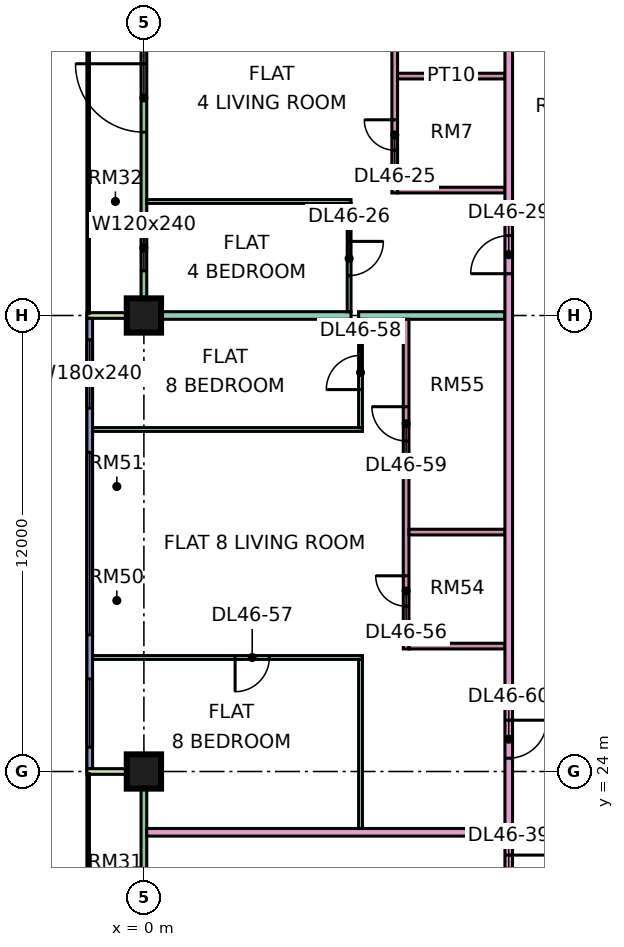
"""IFC4 building model, lengths in metres.
Left out: names, types, materials, properties, quantities, classifications, styles, units other than length and angle.
Written with IfcOpenShell. Run it as: python <this file> out.ifc"""

import sys

from ifc_helpers import new_model, si_unit, direction, frame, frame_2d, origin, origin_2d, place, context, subcontext, project, spatial, rectangle, extrude, element, fill, save


model = new_model("IFC4")
c1 = context("Model", 3, precision=1e-05, world=origin(), true_north=direction((0.0, 1.0)))
c2 = subcontext(c1, "Body", "Model", "MODEL_VIEW")
j1 = project(units=[si_unit("LENGTHUNIT", "METRE"), si_unit("PLANEANGLEUNIT", "RADIAN")], contexts=[c1])
p1 = place(None, origin())
s1 = spatial("IfcSite", under=j1, at=p1, CompositionType="ELEMENT")
p2 = place(p1, origin())
s2 = spatial("IfcBuilding", under=s1, at=p2, CompositionType="ELEMENT")
p3 = place(p2, frame((0.0, 0.0, 198.65)))
s3 = spatial("IfcBuildingStorey", under=s2, at=p3, CompositionType="ELEMENT", Elevation=198.65)
p4 = place(p3, frame((0.0, 24.0, 0.0), z_axis=(0.0, 0.0, 1.0), x_axis=(1.0, 0.0, 0.0)))
e1 = element("IfcColumn", 1, at=p4, inside=s3, PredefinedType="COLUMN", context=c2, shape_type="SweptSolid", body=[
    extrude(rectangle(XDim=0.9, YDim=0.9, at=origin_2d()), origin(), (0.0, 0.0, 1.0), 3.75),
])
p5 = place(p3, frame((0.0, 36.0, 0.0), z_axis=(0.0, 0.0, 1.0), x_axis=(1.0, 0.0, 0.0)))
e2 = element("IfcColumn", 2, at=p5, inside=s3, PredefinedType="COLUMN", context=c2, shape_type="SweptSolid", body=[
    extrude(rectangle(XDim=0.9, YDim=0.9, at=origin_2d()), origin(), (0.0, 0.0, 1.0), 3.75),
])
p6 = place(p3, frame((0.0, 47.925, 0.0), z_axis=(0.0, 0.0, 1.0), x_axis=(0.0, -1.0, 0.0)))
e3 = element("IfcWall", 3, at=p6, inside=s3, PredefinedType="SOLIDWALL", context=c2, shape_type="SweptSolid", body=[
    extrude(rectangle(XDim=11.85, YDim=0.15, at=frame_2d((5.925, 0.0))), origin(), (0.0, 0.0, 1.0), 3.35),
])
p7 = place(p6, frame((0.587, 0.0, 0.45)))
e4 = element("IfcOpeningElement", 4, at=p7, cuts=e3, PredefinedType="OPENING", context=c2, shape_type="SweptSolid", body=[
    extrude(rectangle(XDim=1.2, YDim=2.4, at=frame_2d((0.6, 1.2))), frame((0.0, 0.085, 0.0), z_axis=(0.0, -1.0, 0.0), x_axis=(1.0, 0.0, 0.0)), (0.0, 0.0, 1.0), 0.17),
])
p8 = place(p6, frame((5.3, 0.0, 0.0)))
e5 = element("IfcOpeningElement", 5, at=p8, cuts=e3, PredefinedType="OPENING", context=c2, shape_type="SweptSolid", body=[
    extrude(rectangle(XDim=1.8, YDim=2.4, at=frame_2d((0.9, 1.2))), frame((0.0, 0.085, 0.0), z_axis=(0.0, -1.0, 0.0), x_axis=(1.0, 0.0, 0.0)), (0.0, 0.0, 1.0), 0.17),
])
p9 = place(p6, frame((9.55, 0.0, 0.45)))
e6 = element("IfcOpeningElement", 6, at=p9, cuts=e3, PredefinedType="OPENING", context=c2, shape_type="SweptSolid", body=[
    extrude(rectangle(XDim=1.2, YDim=2.4, at=frame_2d((0.6, 1.2))), frame((0.0, 0.085, 0.0), z_axis=(0.0, -1.0, 0.0), x_axis=(1.0, 0.0, 0.0)), (0.0, 0.0, 1.0), 0.17),
])
p10 = place(p3, frame((-1.5, 36.0, 0.0), z_axis=(0.0, 0.0, 1.0), x_axis=(1.0, 0.0, 0.0)))
e7 = element("IfcWall", 7, at=p10, inside=s3, PredefinedType="SOLIDWALL", context=c2, shape_type="SweptSolid", body=[
    extrude(rectangle(XDim=1.5, YDim=0.15, at=frame_2d((0.75, 0.0))), origin(), (0.0, 0.0, 1.0), 3.35),
])
p11 = place(p3, frame((-1.425, 35.925, 0.0), z_axis=(0.0, 0.0, 1.0), x_axis=(0.0, -1.0, 0.0)))
e8 = element("IfcWall", 8, at=p11, inside=s3, PredefinedType="SOLIDWALL", context=c2, shape_type="SweptSolid", body=[
    extrude(rectangle(XDim=11.85, YDim=0.15, at=frame_2d((5.925, 0.0))), origin(), (0.0, 0.0, 1.0), 3.35),
])
p12 = place(p11, frame((0.562, 0.0, 0.45)))
e9 = element("IfcOpeningElement", 9, at=p12, cuts=e8, PredefinedType="OPENING", context=c2, shape_type="SweptSolid", body=[
    extrude(rectangle(XDim=1.8, YDim=2.4, at=frame_2d((0.9, 1.2))), frame((0.0, 0.085, 0.0), z_axis=(0.0, -1.0, 0.0), x_axis=(1.0, 0.0, 0.0)), (0.0, 0.0, 1.0), 0.17),
])
p13 = place(p11, frame((3.525, 0.0, 0.45)))
e10 = element("IfcOpeningElement", 10, at=p13, cuts=e8, PredefinedType="OPENING", context=c2, shape_type="SweptSolid", body=[
    extrude(rectangle(XDim=4.8, YDim=2.4, at=frame_2d((2.4, 1.2))), frame((0.0, 0.085, 0.0), z_axis=(0.0, -1.0, 0.0), x_axis=(1.0, 0.0, 0.0)), (0.0, 0.0, 1.0), 0.17),
])
p14 = place(p11, frame((9.488, 0.0, 0.45)))
e11 = element("IfcOpeningElement", 11, at=p14, cuts=e8, PredefinedType="OPENING", context=c2, shape_type="SweptSolid", body=[
    extrude(rectangle(XDim=1.8, YDim=2.4, at=frame_2d((0.9, 1.2))), frame((0.0, 0.085, 0.0), z_axis=(0.0, -1.0, 0.0), x_axis=(1.0, 0.0, 0.0)), (0.0, 0.0, 1.0), 0.17),
])
p15 = place(p3, frame((0.0, 23.925, 0.0), z_axis=(0.0, 0.0, 1.0), x_axis=(0.0, -1.0, 0.0)))
e12 = element("IfcWall", 12, at=p15, inside=s3, PredefinedType="SOLIDWALL", context=c2, shape_type="SweptSolid", body=[
    extrude(rectangle(XDim=11.35, YDim=0.15, at=frame_2d((5.675, 0.0))), origin(), (0.0, 0.0, 1.0), 3.35),
])
p16 = place(p15, frame((6.738, 0.0, 0.0)))
e13 = element("IfcOpeningElement", 13, at=p16, cuts=e12, PredefinedType="OPENING", context=c2, shape_type="SweptSolid", body=[
    extrude(rectangle(XDim=1.8, YDim=2.4, at=frame_2d((0.9, 1.2))), frame((0.0, 0.085, 0.0), z_axis=(0.0, -1.0, 0.0), x_axis=(1.0, 0.0, 0.0)), (0.0, 0.0, 1.0), 0.17),
])
p17 = place(p3, frame((-1.5, 24.0, 0.0), z_axis=(0.0, 0.0, 1.0), x_axis=(1.0, 0.0, 0.0)))
e14 = element("IfcWall", 14, at=p17, inside=s3, PredefinedType="SOLIDWALL", context=c2, shape_type="SweptSolid", body=[
    extrude(rectangle(XDim=1.5, YDim=0.15, at=frame_2d((0.75, 0.0))), origin(), (0.0, 0.0, 1.0), 3.35),
])
p18 = place(p3, frame((-1.35, 27.0, 0.0), z_axis=(0.0, 0.0, 1.0), x_axis=(1.0, 0.0, 0.0)))
e15 = element("IfcWall", 15, at=p18, inside=s3, PredefinedType="PARTITIONING", context=c2, shape_type="SweptSolid", body=[
    extrude(rectangle(XDim=7.1, YDim=0.1, at=frame_2d((3.55, 0.0))), origin(), (0.0, 0.0, 1.0), 3.35),
])
p19 = place(p18, frame((3.75, 0.0, 0.0)))
e16 = element("IfcOpeningElement", 16, at=p19, cuts=e15, PredefinedType="OPENING", context=c2, shape_type="SweptSolid", body=[
    extrude(rectangle(XDim=0.9, YDim=2.1, at=frame_2d((0.45, 1.05))), frame((0.0, 0.06, 0.0), z_axis=(0.0, -1.0, 0.0), x_axis=(1.0, 0.0, 0.0)), (0.0, 0.0, 1.0), 0.12),
])
p20 = place(p3, frame((-1.35, 33.0, 0.0), z_axis=(0.0, 0.0, 1.0), x_axis=(1.0, 0.0, 0.0)))
e17 = element("IfcWall", 17, at=p20, inside=s3, PredefinedType="PARTITIONING", context=c2, shape_type="SweptSolid", body=[
    extrude(rectangle(XDim=7.1, YDim=0.1, at=frame_2d((3.55, 0.0))), origin(), (0.0, 0.0, 1.0), 3.35),
])
e18 = element("IfcWall", 18, at=p5, inside=s3, PredefinedType="PARTITIONING", context=c2, shape_type="SweptSolid", body=[
    extrude(rectangle(XDim=5.45, YDim=0.2, at=frame_2d((2.725, 0.0))), origin(), (0.0, 0.0, 1.0), 3.35),
])
p21 = place(p3, frame((0.074, 22.4, 0.0), z_axis=(0.0, 0.0, 1.0), x_axis=(1.0, 0.0, 0.0)))
e19 = element("IfcWall", 19, at=p21, inside=s3, PredefinedType="PARTITIONING", context=c2, shape_type="SweptSolid", body=[
    extrude(rectangle(XDim=9.426, YDim=0.2, at=frame_2d((4.713, 0.0))), origin(), (0.0, 0.0, 1.0), 3.35),
])
p22 = place(p3, frame((0.074, 39.0, 0.0), z_axis=(0.0, 0.0, 1.0), x_axis=(1.0, 0.0, 0.0)))
e20 = element("IfcWall", 20, at=p22, inside=s3, PredefinedType="PARTITIONING", context=c2, shape_type="SweptSolid", body=[
    extrude(rectangle(XDim=5.376, YDim=0.1, at=frame_2d((2.688, 0.0))), origin(), (0.0, 0.0, 1.0), 3.35),
])
p23 = place(p3, frame((5.4, 36.1, 0.0), z_axis=(0.0, 0.0, 1.0), x_axis=(0.0, 1.0, 0.0)))
e21 = element("IfcWall", 21, at=p23, inside=s3, PredefinedType="PARTITIONING", context=c2, shape_type="SweptSolid", body=[
    extrude(rectangle(XDim=2.85, YDim=0.1, at=frame_2d((1.425, 0.0))), origin(), (0.0, 0.0, 1.0), 3.35),
])
p24 = place(p23, frame((0.95, 0.0, 0.0)))
e22 = element("IfcOpeningElement", 22, at=p24, cuts=e21, PredefinedType="OPENING", context=c2, shape_type="SweptSolid", body=[
    extrude(rectangle(XDim=0.9, YDim=2.1, at=frame_2d((0.45, 1.05))), frame((0.0, 0.06, 0.0), z_axis=(0.0, -1.0, 0.0), x_axis=(1.0, 0.0, 0.0)), (0.0, 0.0, 1.0), 0.12),
])
p25 = place(p3, frame((5.65, 36.0, 0.0), z_axis=(0.0, 0.0, 1.0), x_axis=(1.0, 0.0, 0.0)))
e23 = element("IfcWall", 23, at=p25, inside=s3, PredefinedType="PARTITIONING", context=c2, shape_type="SweptSolid", body=[
    extrude(rectangle(XDim=3.85, YDim=0.2, at=frame_2d((1.925, 0.0))), origin(), (0.0, 0.0, 1.0), 3.35),
])
p26 = place(p3, frame((5.7, 22.5, 0.0), z_axis=(0.0, 0.0, 1.0), x_axis=(0.0, 1.0, 0.0)))
e24 = element("IfcWall", 24, at=p26, inside=s3, PredefinedType="PARTITIONING", context=c2, shape_type="SweptSolid", body=[
    extrude(rectangle(XDim=4.45, YDim=0.1, at=frame_2d((2.225, 0.0))), origin(), (0.0, 0.0, 1.0), 3.35),
])
p27 = place(p3, frame((5.7, 33.05, 0.0), z_axis=(0.0, 0.0, 1.0), x_axis=(0.0, 1.0, 0.0)))
e25 = element("IfcWall", 25, at=p27, inside=s3, PredefinedType="PARTITIONING", context=c2, shape_type="SweptSolid", body=[
    extrude(rectangle(XDim=2.85, YDim=0.1, at=frame_2d((1.425, 0.0))), origin(), (0.0, 0.0, 1.0), 3.35),
])
p28 = place(p27, frame((1.0, 0.0, 0.0)))
e26 = element("IfcOpeningElement", 26, at=p28, cuts=e25, PredefinedType="OPENING", context=c2, shape_type="SweptSolid", body=[
    extrude(rectangle(XDim=0.9, YDim=2.1, at=frame_2d((0.45, 1.05))), frame((0.0, 0.06, 0.0), z_axis=(0.0, -1.0, 0.0), x_axis=(1.0, 0.0, 0.0)), (0.0, 0.0, 1.0), 0.12),
])
p29 = place(p3, frame((6.6, 39.225, 0.0), z_axis=(0.0, 0.0, 1.0), x_axis=(0.0, 1.0, 0.0)))
e27 = element("IfcWall", 27, at=p29, inside=s3, PredefinedType="PARTITIONING", context=c2, shape_type="SweptSolid", body=[
    extrude(rectangle(XDim=8.675, YDim=0.15, at=frame_2d((4.337, 0.0))), origin(), (0.0, 0.0, 1.0), 3.35),
])
p30 = place(p29, frame((1.125, 0.0, 0.0)))
e28 = element("IfcOpeningElement", 28, at=p30, cuts=e27, PredefinedType="OPENING", context=c2, shape_type="SweptSolid", body=[
    extrude(rectangle(XDim=0.8, YDim=2.1, at=frame_2d((0.4, 1.05))), frame((0.0, 0.085, 0.0), z_axis=(0.0, -1.0, 0.0), x_axis=(1.0, 0.0, 0.0)), (0.0, 0.0, 1.0), 0.17),
])
p31 = place(p29, frame((5.475, 0.0, 0.0)))
e29 = element("IfcOpeningElement", 29, at=p31, cuts=e27, PredefinedType="OPENING", context=c2, shape_type="SweptSolid", body=[
    extrude(rectangle(XDim=0.9, YDim=2.1, at=frame_2d((0.45, 1.05))), frame((0.0, 0.085, 0.0), z_axis=(0.0, -1.0, 0.0), x_axis=(1.0, 0.0, 0.0)), (0.0, 0.0, 1.0), 0.17),
])
for number, where, z_axis, x_axis in (
    (30, (6.675, 39.3, 0.0), (0.0, 0.0, 1.0), (1.0, 0.0, 0.0)),
    (31, (6.675, 42.3, 0.0), (0.0, 0.0, 1.0), (1.0, 0.0, 0.0)),
):
    element("IfcWall", number, at=place(p3, frame(where, z_axis=z_axis, x_axis=x_axis)), inside=s3, PredefinedType="PARTITIONING", context=c2, shape_type="SweptSolid", body=[
        extrude(rectangle(XDim=2.825, YDim=0.15, at=frame_2d((1.413, 0.0))), origin(), (0.0, 0.0, 1.0), 3.35),
    ])
p32 = place(p3, frame((6.9, 27.225, 0.0), z_axis=(0.0, 0.0, 1.0), x_axis=(0.0, 1.0, 0.0)))
e32 = element("IfcWall", 32, at=p32, inside=s3, PredefinedType="PARTITIONING", context=c2, shape_type="SweptSolid", body=[
    extrude(rectangle(XDim=8.675, YDim=0.15, at=frame_2d((4.337, 0.0))), origin(), (0.0, 0.0, 1.0), 3.35),
])
p33 = place(p32, frame((1.125, 0.0, 0.0)))
e33 = element("IfcOpeningElement", 33, at=p33, cuts=e32, PredefinedType="OPENING", context=c2, shape_type="SweptSolid", body=[
    extrude(rectangle(XDim=0.8, YDim=2.1, at=frame_2d((0.4, 1.05))), frame((0.0, 0.085, 0.0), z_axis=(0.0, -1.0, 0.0), x_axis=(1.0, 0.0, 0.0)), (0.0, 0.0, 1.0), 0.17),
])
p34 = place(p32, frame((5.475, 0.0, 0.0)))
e34 = element("IfcOpeningElement", 34, at=p34, cuts=e32, PredefinedType="OPENING", context=c2, shape_type="SweptSolid", body=[
    extrude(rectangle(XDim=0.9, YDim=2.1, at=frame_2d((0.45, 1.05))), frame((0.0, 0.085, 0.0), z_axis=(0.0, -1.0, 0.0), x_axis=(1.0, 0.0, 0.0)), (0.0, 0.0, 1.0), 0.17),
])
for number, where, z_axis, x_axis in (
    (35, (6.975, 27.3, 0.0), (0.0, 0.0, 1.0), (1.0, 0.0, 0.0)),
    (36, (6.975, 30.3, 0.0), (0.0, 0.0, 1.0), (1.0, 0.0, 0.0)),
):
    element("IfcWall", number, at=place(p3, frame(where, z_axis=z_axis, x_axis=x_axis)), inside=s3, PredefinedType="PARTITIONING", context=c2, shape_type="SweptSolid", body=[
        extrude(rectangle(XDim=2.525, YDim=0.15, at=frame_2d((1.262, 0.0))), origin(), (0.0, 0.0, 1.0), 3.35),
    ])
p35 = place(p3, frame((9.6, 20.0, 0.0), z_axis=(0.0, 0.0, 1.0), x_axis=(0.0, 1.0, 0.0)))
e37 = element("IfcWall", 37, at=p35, inside=s3, PredefinedType="PARTITIONING", context=c2, shape_type="SweptSolid", body=[
    extrude(rectangle(XDim=44.35, YDim=0.2, at=frame_2d((22.175, 0.0))), origin(), (0.0, 0.0, 1.0), 3.35),
])
p36 = place(p35, frame((17.1, 0.0, 0.0)))
e38 = element("IfcOpeningElement", 38, at=p36, cuts=e37, PredefinedType="OPENING", context=c2, shape_type="SweptSolid", body=[
    extrude(rectangle(XDim=1.0, YDim=2.1, at=frame_2d((0.5, 1.05))), frame((0.0, 0.11, 0.0), z_axis=(0.0, -1.0, 0.0), x_axis=(1.0, 0.0, 0.0)), (0.0, 0.0, 1.0), 0.22),
])
p37 = place(p35, frame((29.1, 0.0, 0.0)))
e39 = element("IfcOpeningElement", 39, at=p37, cuts=e37, PredefinedType="OPENING", context=c2, shape_type="SweptSolid", body=[
    extrude(rectangle(XDim=1.0, YDim=2.1, at=frame_2d((0.5, 1.05))), frame((0.0, 0.11, 0.0), z_axis=(0.0, -1.0, 0.0), x_axis=(1.0, 0.0, 0.0)), (0.0, 0.0, 1.0), 0.22),
])
p38 = place(p35, frame((0.6, 0.0, 0.0)))
e40 = element("IfcOpeningElement", 40, at=p38, cuts=e37, PredefinedType="OPENING", context=c2, shape_type="SweptSolid", body=[
    extrude(rectangle(XDim=1.2, YDim=2.1, at=frame_2d((0.6, 1.05))), frame((0.0, 0.11, 0.0), z_axis=(0.0, -1.0, 0.0), x_axis=(1.0, 0.0, 0.0)), (0.0, 0.0, 1.0), 0.22),
])
p39 = place(p35, frame((4.35, 0.0, 0.0)))
e41 = element("IfcOpeningElement", 41, at=p39, cuts=e37, PredefinedType="OPENING", context=c2, shape_type="SweptSolid", body=[
    extrude(rectangle(XDim=1.0, YDim=2.1, at=frame_2d((0.5, 1.05))), frame((0.0, 0.11, 0.0), z_axis=(0.0, -1.0, 0.0), x_axis=(1.0, 0.0, 0.0)), (0.0, 0.0, 1.0), 0.22),
])
p40 = place(p8, frame((1.8, 0.0, 0.0), z_axis=(0.0, 0.0, 1.0), x_axis=(-1.0, 0.0, 0.0)))
e42 = element("IfcDoor", 42, at=p40, inside=s3, OperationType="DOUBLE_DOOR_SINGLE_SWING", PredefinedType="DOOR", context=c2, shape_type="SweptSolid", body=[
    extrude(rectangle(XDim=1.8, YDim=2.4, at=frame_2d((0.9, 1.2))), frame((0.0, 0.025, 0.0), z_axis=(0.0, -1.0, 0.0), x_axis=(1.0, 0.0, 0.0)), (0.0, 0.0, 1.0), 0.05),
])
fill(e5, e42)
p41 = place(p9, origin())
e43 = element("IfcWindow", 43, at=p41, inside=s3, PartitioningType="SINGLE_PANEL", PredefinedType="WINDOW", context=c2, shape_type="SweptSolid", body=[
    extrude(rectangle(XDim=1.2, YDim=2.4, at=frame_2d((0.6, 1.2))), frame((0.0, 0.03, 0.0), z_axis=(0.0, -1.0, 0.0), x_axis=(1.0, 0.0, 0.0)), (0.0, 0.0, 1.0), 0.06),
])
fill(e6, e43)
p42 = place(p12, origin())
e44 = element("IfcWindow", 44, at=p42, inside=s3, PartitioningType="SINGLE_PANEL", PredefinedType="WINDOW", context=c2, shape_type="SweptSolid", body=[
    extrude(rectangle(XDim=1.8, YDim=2.4, at=frame_2d((0.9, 1.2))), frame((0.0, 0.03, 0.0), z_axis=(0.0, -1.0, 0.0), x_axis=(1.0, 0.0, 0.0)), (0.0, 0.0, 1.0), 0.06),
])
fill(e9, e44)
p43 = place(p13, origin())
e45 = element("IfcWindow", 45, at=p43, inside=s3, PartitioningType="SINGLE_PANEL", PredefinedType="WINDOW", context=c2, shape_type="SweptSolid", body=[
    extrude(rectangle(XDim=4.8, YDim=2.4, at=frame_2d((2.4, 1.2))), frame((0.0, 0.03, 0.0), z_axis=(0.0, -1.0, 0.0), x_axis=(1.0, 0.0, 0.0)), (0.0, 0.0, 1.0), 0.06),
])
fill(e10, e45)
p44 = place(p14, origin())
e46 = element("IfcWindow", 46, at=p44, inside=s3, PartitioningType="SINGLE_PANEL", PredefinedType="WINDOW", context=c2, shape_type="SweptSolid", body=[
    extrude(rectangle(XDim=1.8, YDim=2.4, at=frame_2d((0.9, 1.2))), frame((0.0, 0.03, 0.0), z_axis=(0.0, -1.0, 0.0), x_axis=(1.0, 0.0, 0.0)), (0.0, 0.0, 1.0), 0.06),
])
fill(e11, e46)
p45 = place(p30, frame((0.8, 0.0, 0.0), z_axis=(0.0, 0.0, 1.0), x_axis=(-1.0, 0.0, 0.0)))
e47 = element("IfcDoor", 47, at=p45, inside=s3, OperationType="SINGLE_SWING_RIGHT", PredefinedType="DOOR", context=c2, shape_type="SweptSolid", body=[
    extrude(rectangle(XDim=0.8, YDim=2.1, at=frame_2d((0.4, 1.05))), frame((0.0, 0.025, 0.0), z_axis=(0.0, -1.0, 0.0), x_axis=(1.0, 0.0, 0.0)), (0.0, 0.0, 1.0), 0.05),
])
fill(e28, e47)
p46 = place(p24, origin())
e48 = element("IfcDoor", 48, at=p46, inside=s3, OperationType="SINGLE_SWING_RIGHT", PredefinedType="DOOR", context=c2, shape_type="SweptSolid", body=[
    extrude(rectangle(XDim=0.9, YDim=2.1, at=frame_2d((0.45, 1.05))), frame((0.0, 0.025, 0.0), z_axis=(0.0, -1.0, 0.0), x_axis=(1.0, 0.0, 0.0)), (0.0, 0.0, 1.0), 0.05),
])
fill(e22, e48)
p47 = place(p36, origin())
e49 = element("IfcDoor", 49, at=p47, inside=s3, OperationType="SINGLE_SWING_LEFT", PredefinedType="DOOR", context=c2, shape_type="SweptSolid", body=[
    extrude(rectangle(XDim=1.0, YDim=2.1, at=frame_2d((0.5, 1.05))), frame((0.0, 0.025, 0.0), z_axis=(0.0, -1.0, 0.0), x_axis=(1.0, 0.0, 0.0)), (0.0, 0.0, 1.0), 0.05),
])
fill(e38, e49)
p48 = place(p38, origin())
e50 = element("IfcDoor", 50, at=p48, inside=s3, OperationType="SINGLE_SWING_RIGHT", PredefinedType="DOOR", context=c2, shape_type="SweptSolid", body=[
    extrude(rectangle(XDim=1.2, YDim=2.1, at=frame_2d((0.6, 1.05))), frame((0.0, 0.025, 0.0), z_axis=(0.0, -1.0, 0.0), x_axis=(1.0, 0.0, 0.0)), (0.0, 0.0, 1.0), 0.05),
])
fill(e40, e50)
p49 = place(p33, frame((0.8, 0.0, 0.0), z_axis=(0.0, 0.0, 1.0), x_axis=(-1.0, 0.0, 0.0)))
e51 = element("IfcDoor", 51, at=p49, inside=s3, OperationType="SINGLE_SWING_RIGHT", PredefinedType="DOOR", context=c2, shape_type="SweptSolid", body=[
    extrude(rectangle(XDim=0.8, YDim=2.1, at=frame_2d((0.4, 1.05))), frame((0.0, 0.025, 0.0), z_axis=(0.0, -1.0, 0.0), x_axis=(1.0, 0.0, 0.0)), (0.0, 0.0, 1.0), 0.05),
])
fill(e33, e51)
p50 = place(p19, frame((0.9, 0.0, 0.0), z_axis=(0.0, 0.0, 1.0), x_axis=(-1.0, 0.0, 0.0)))
e52 = element("IfcDoor", 52, at=p50, inside=s3, OperationType="SINGLE_SWING_LEFT", PredefinedType="DOOR", context=c2, shape_type="SweptSolid", body=[
    extrude(rectangle(XDim=0.9, YDim=2.1, at=frame_2d((0.45, 1.05))), frame((0.0, 0.025, 0.0), z_axis=(0.0, -1.0, 0.0), x_axis=(1.0, 0.0, 0.0)), (0.0, 0.0, 1.0), 0.05),
])
fill(e16, e52)
p51 = place(p28, origin())
e53 = element("IfcDoor", 53, at=p51, inside=s3, OperationType="SINGLE_SWING_LEFT", PredefinedType="DOOR", context=c2, shape_type="SweptSolid", body=[
    extrude(rectangle(XDim=0.9, YDim=2.1, at=frame_2d((0.45, 1.05))), frame((0.0, 0.025, 0.0), z_axis=(0.0, -1.0, 0.0), x_axis=(1.0, 0.0, 0.0)), (0.0, 0.0, 1.0), 0.05),
])
fill(e26, e53)
p52 = place(p34, frame((0.9, 0.0, 0.0), z_axis=(0.0, 0.0, 1.0), x_axis=(-1.0, 0.0, 0.0)))
e54 = element("IfcDoor", 54, at=p52, inside=s3, OperationType="SINGLE_SWING_RIGHT", PredefinedType="DOOR", context=c2, shape_type="SweptSolid", body=[
    extrude(rectangle(XDim=0.9, YDim=2.1, at=frame_2d((0.45, 1.05))), frame((0.0, 0.025, 0.0), z_axis=(0.0, -1.0, 0.0), x_axis=(1.0, 0.0, 0.0)), (0.0, 0.0, 1.0), 0.05),
])
fill(e34, e54)
p53 = place(p39, origin())
e55 = element("IfcDoor", 55, at=p53, inside=s3, OperationType="SINGLE_SWING_RIGHT", PredefinedType="DOOR", context=c2, shape_type="SweptSolid", body=[
    extrude(rectangle(XDim=1.0, YDim=2.1, at=frame_2d((0.5, 1.05))), frame((0.0, 0.025, 0.0), z_axis=(0.0, -1.0, 0.0), x_axis=(1.0, 0.0, 0.0)), (0.0, 0.0, 1.0), 0.05),
])
fill(e41, e55)
save(model, sys.argv[1])
